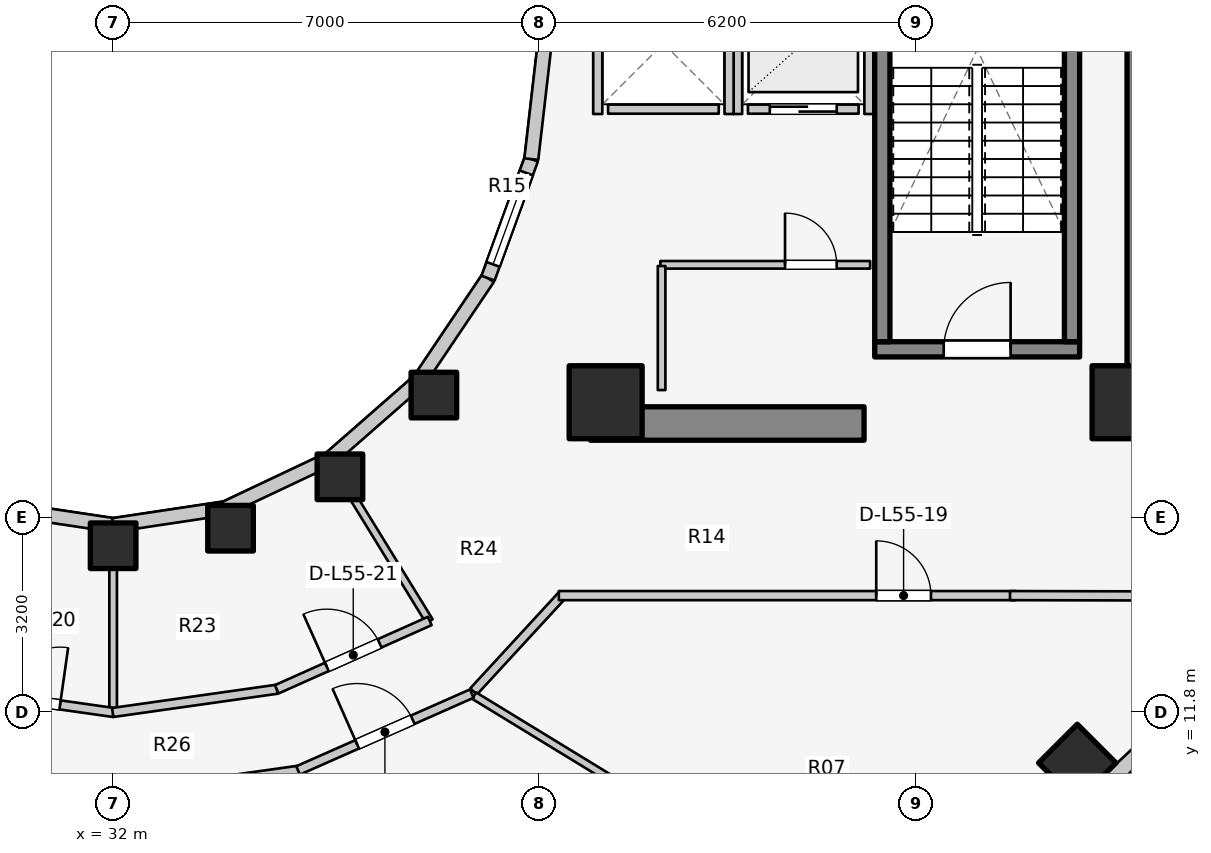
"""IFC4 building model, lengths in metres.
Left out: names, types, materials, properties, quantities, classifications, styles, units other than length and angle.
Written with IfcOpenShell. Run it as: python <this file> out.ifc"""

import sys

from ifc_helpers import new_model, si_unit, direction, frame, frame_2d, origin, origin_2d, place, context, subcontext, project, spatial, rectangle, extrude, element, fill, save


model = new_model("IFC4")
c1 = context("Model", 3, precision=1e-05, world=origin(), true_north=direction((0.0, 1.0)))
c2 = subcontext(c1, "Body", "Model", "MODEL_VIEW")
j1 = project(units=[si_unit("LENGTHUNIT", "METRE"), si_unit("PLANEANGLEUNIT", "RADIAN")], contexts=[c1])
p1 = place(None, origin())
s1 = spatial("IfcSite", under=j1, at=p1, CompositionType="ELEMENT")
p2 = place(p1, origin())
s2 = spatial("IfcBuilding", under=s1, at=p2, CompositionType="ELEMENT")
p3 = place(p2, frame((0.0, 0.0, 180.8)))
s3 = spatial("IfcBuildingStorey", under=s2, at=p3, CompositionType="ELEMENT", Elevation=180.8)
p4 = place(p3, frame((48.95, 17.05, 0.0), z_axis=(0.0, 0.0, 1.0), x_axis=(0.0, 1.0, 0.0)))
e1 = element("IfcWall", 1, at=p4, inside=s3, PredefinedType="SHEAR", context=c2, shape_type="SweptSolid", body=[
    extrude(rectangle(XDim=12.8, YDim=0.55, at=frame_2d((6.4, 0.0))), origin(), (0.0, 0.0, 1.0), 3.1),
])
p5 = place(p3, frame((39.85, 16.55, 0.0), z_axis=(0.0, 0.0, 1.0), x_axis=(1.0, 0.0, 0.0)))
e2 = element("IfcWall", 2, at=p5, inside=s3, PredefinedType="SHEAR", context=c2, shape_type="SweptSolid", body=[
    extrude(rectangle(XDim=4.5, YDim=0.55, at=frame_2d((2.25, 0.0))), origin(), (0.0, 0.0, 1.0), 3.1),
])
p6 = place(p3, frame((44.525, 17.77, 0.0), z_axis=(0.0, 0.0, 1.0), x_axis=(1.0, 0.0, 0.0)))
e3 = element("IfcWall", 3, at=p6, inside=s3, PredefinedType="SOLIDWALL", context=c2, shape_type="SweptSolid", body=[
    extrude(rectangle(XDim=3.37, YDim=0.25, at=frame_2d((1.685, 0.0))), origin(), (0.0, 0.0, 1.0), 3.1),
])
p7 = place(p6, frame((1.135, 0.0, 0.0)))
e4 = element("IfcOpeningElement", 4, at=p7, cuts=e3, PredefinedType="OPENING", context=c2, shape_type="SweptSolid", body=[
    extrude(rectangle(XDim=1.1, YDim=2.1, at=frame_2d((0.55, 1.05))), frame((0.0, 0.135, 0.0), z_axis=(0.0, -1.0, 0.0), x_axis=(1.0, 0.0, 0.0)), (0.0, 0.0, 1.0), 0.27),
])
for number, where, z_axis, x_axis in (
    (5, (44.65, 17.895, 0.0), (0.0, 0.0, 1.0), (0.0, 1.0, 0.0)),
    (6, (47.77, 17.895, 0.0), (0.0, 0.0, 1.0), (0.0, 1.0, 0.0)),
):
    element("IfcWall", number, at=place(p3, frame(where, z_axis=z_axis, x_axis=x_axis)), inside=s3, PredefinedType="SOLIDWALL", context=c2, shape_type="SweptSolid", body=[
        extrude(rectangle(XDim=7.81, YDim=0.25, at=frame_2d((3.905, 0.0))), origin(), (0.0, 0.0, 1.0), 3.1),
    ])
for number, where, z_axis, x_axis in (
    (7, (40.1, 16.9, 0.0), (0.0, 0.0, 1.0), (1.0, 0.0, 0.0)),
    (8, (48.7, 16.9, 0.0), (0.0, 0.0, 1.0), (1.0, 0.0, 0.0)),
):
    element("IfcColumn", number, at=place(p3, frame(where, z_axis=z_axis, x_axis=x_axis)), inside=s3, PredefinedType="COLUMN", context=c2, shape_type="SweptSolid", body=[
        extrude(rectangle(XDim=1.2, YDim=1.2, at=origin_2d()), origin(), (0.0, 0.0, 1.0), 3.1),
    ])
for number, where, z_axis, x_axis in (
    (9, (32.0, 14.54, 0.0), (0.0, 0.0, 1.0), (1.0, 0.0, 0.0)),
    (10, (33.931, 14.828, 0.0), (0.0, 0.0, 1.0), (1.0, 0.0, 0.0)),
    (11, (35.73, 15.673, 0.0), (0.0, 0.0, 1.0), (1.0, 0.0, 0.0)),
    (12, (37.275, 17.018, 0.0), (0.0, 0.0, 1.0), (1.0, 0.0, 0.0)),
):
    element("IfcColumn", number, at=place(p3, frame(where, z_axis=z_axis, x_axis=x_axis)), inside=s3, PredefinedType="COLUMN", context=c2, shape_type="SweptSolid", body=[
        extrude(rectangle(XDim=0.75, YDim=0.75, at=origin_2d()), origin(), (0.0, 0.0, 1.0), 3.1),
    ])
p8 = place(p3, frame((47.857, 10.969, 0.0), z_axis=(0.0, 0.0, 1.0), x_axis=(0.707106781187, -0.707106781187, 0.0)))
e13 = element("IfcColumn", 13, at=p8, inside=s3, PredefinedType="COLUMN", context=c2, shape_type="SweptSolid", body=[
    extrude(rectangle(XDim=0.9, YDim=0.9, at=origin_2d()), origin(), (0.0, 0.0, 1.0), 3.1),
])
for number, where, z_axis, x_axis in (
    (14, (30.157, 15.157, 0.0), (0.0, 0.0, 1.0), (0.989, -0.149, 0.0)),
    (15, (32.0, 14.88, 0.0), (0.0, 0.0, 1.0), (0.989, 0.149, 0.0)),
):
    element("IfcWall", number, at=place(p3, frame(where, z_axis=z_axis, x_axis=x_axis)), inside=s3, PredefinedType="STANDARD", context=c2, shape_type="SweptSolid", body=[
        extrude(rectangle(XDim=1.864, YDim=0.23, at=frame_2d((0.932, 0.0))), origin(), (0.0, 0.0, 1.0), 2.16),
    ])
p9 = place(p3, frame((33.843, 15.157, 0.0), z_axis=(0.0, 0.0, 1.0), x_axis=(0.904179699603, 0.427152280606, 0.0)))
e16 = element("IfcWall", 16, at=p9, inside=s3, PredefinedType="STANDARD", context=c2, shape_type="SweptSolid", body=[
    extrude(rectangle(XDim=1.899, YDim=0.23, at=frame_2d((0.95, 0.0))), origin(), (0.0, 0.0, 1.0), 2.16),
])
p10 = place(p3, frame((35.56, 15.968, 0.0), z_axis=(0.0, 0.0, 1.0), x_axis=(0.752576694707, 0.658504607869, 0.0)))
e17 = element("IfcWall", 17, at=p10, inside=s3, PredefinedType="STANDARD", context=c2, shape_type="SweptSolid", body=[
    extrude(rectangle(XDim=1.959, YDim=0.23, at=frame_2d((0.98, 0.0))), origin(), (0.0, 0.0, 1.0), 2.16),
])
p11 = place(p3, frame((37.035, 17.258, 0.0), z_axis=(0.0, 0.0, 1.0), x_axis=(0.558197800898, 0.829707909492, 0.0)))
e18 = element("IfcWall", 18, at=p11, inside=s3, PredefinedType="STANDARD", context=c2, shape_type="SweptSolid", body=[
    extrude(rectangle(XDim=2.027, YDim=0.23, at=frame_2d((1.013, 0.0))), origin(), (0.0, 0.0, 1.0), 2.16),
])
p12 = place(p3, frame((38.166, 18.94, 0.0), z_axis=(0.0, 0.0, 1.0), x_axis=(0.341423187295, 0.93990968033, 0.0)))
e19 = element("IfcWall", 19, at=p12, inside=s3, PredefinedType="STANDARD", context=c2, shape_type="SweptSolid", body=[
    extrude(rectangle(XDim=2.084, YDim=0.23, at=frame_2d((1.042, 0.0))), origin(), (0.0, 0.0, 1.0), 2.84),
])
p13 = place(p12, frame((0.242, 0.0, 0.85)))
e20 = element("IfcOpeningElement", 20, at=p13, cuts=e19, PredefinedType="OPENING", context=c2, shape_type="SweptSolid", body=[
    extrude(rectangle(XDim=1.6, YDim=1.65, at=frame_2d((0.8, 0.825))), frame((0.0, 0.125, 0.0), z_axis=(0.0, -1.0, 0.0), x_axis=(1.0, 0.0, 0.0)), (0.0, 0.0, 1.0), 0.25),
])
p14 = place(p3, frame((38.877, 20.898, 0.0), z_axis=(0.0, 0.0, 1.0), x_axis=(0.114711713601, 0.993398823617, 0.0)))
e21 = element("IfcWall", 21, at=p14, inside=s3, PredefinedType="STANDARD", context=c2, shape_type="SweptSolid", body=[
    extrude(rectangle(XDim=2.115, YDim=0.23, at=frame_2d((1.058, 0.0))), origin(), (0.0, 0.0, 1.0), 2.84),
])
p15 = place(p3, frame((48.269, 10.559, 0.0), z_axis=(0.0, 0.0, 1.0), x_axis=(0.727667301037, 0.68593024354, 0.0)))
e22 = element("IfcWall", 22, at=p15, inside=s3, PredefinedType="STANDARD", context=c2, shape_type="SweptSolid", body=[
    extrude(rectangle(XDim=4.604, YDim=0.26, at=frame_2d((2.302, 0.0))), origin(), (0.0, 0.0, 1.0), 2.85),
])
p16 = place(p15, frame((1.552, 0.0, 0.75)))
e23 = element("IfcOpeningElement", 23, at=p16, cuts=e22, PredefinedType="OPENING", context=c2, shape_type="SweptSolid", body=[
    extrude(rectangle(XDim=1.5, YDim=1.6, at=frame_2d((0.75, 0.8))), frame((0.0, 0.14, 0.0), z_axis=(0.0, -1.0, 0.0), x_axis=(1.0, 0.0, 0.0)), (0.0, 0.0, 1.0), 0.28),
])
p17 = place(p3, frame((42.44, 21.72, 0.0), z_axis=(0.0, 0.0, 1.0), x_axis=(1.0, 0.0, 0.0)))
e24 = element("IfcWall", 24, at=p17, inside=s3, PredefinedType="SOLIDWALL", context=c2, shape_type="SweptSolid", body=[
    extrude(rectangle(XDim=1.82, YDim=0.15, at=frame_2d((0.91, 0.0))), origin(), (0.0, 0.0, 1.0), 2.855),
])
p18 = place(p17, frame((0.36, 0.0, 0.0)))
e25 = element("IfcOpeningElement", 25, at=p18, cuts=e24, PredefinedType="OPENING", context=c2, shape_type="SweptSolid", body=[
    extrude(rectangle(XDim=1.1, YDim=2.1, at=frame_2d((0.55, 1.05))), frame((0.0, 0.085, 0.0), z_axis=(0.0, -1.0, 0.0), x_axis=(1.0, 0.0, 0.0)), (0.0, 0.0, 1.0), 0.17),
])
for number, where, z_axis, x_axis in (
    (26, (42.27, 21.64, 0.0), (0.0, 0.0, 1.0), (0.0, 1.0, 0.0)),
    (27, (44.43, 21.64, 0.0), (0.0, 0.0, 1.0), (0.0, 1.0, 0.0)),
):
    element("IfcWall", number, at=place(p3, frame(where, z_axis=z_axis, x_axis=x_axis)), inside=s3, PredefinedType="SOLIDWALL", context=c2, shape_type="SweptSolid", body=[
        extrude(rectangle(XDim=2.32, YDim=0.15, at=frame_2d((1.16, 0.0))), origin(), (0.0, 0.0, 1.0), 2.855),
    ])
p19 = place(p3, frame((40.14, 21.72, 0.0), z_axis=(0.0, 0.0, 1.0), x_axis=(1.0, 0.0, 0.0)))
e28 = element("IfcWall", 28, at=p19, inside=s3, PredefinedType="SOLIDWALL", context=c2, shape_type="SweptSolid", body=[
    extrude(rectangle(XDim=1.82, YDim=0.15, at=frame_2d((0.91, 0.0))), origin(), (0.0, 0.0, 1.0), 2.12),
])
p20 = place(p3, frame((39.97, 21.64, 0.0), z_axis=(0.0, 0.0, 1.0), x_axis=(0.0, 1.0, 0.0)))
e29 = element("IfcWall", 29, at=p20, inside=s3, PredefinedType="SOLIDWALL", context=c2, shape_type="SweptSolid", body=[
    extrude(rectangle(XDim=2.32, YDim=0.15, at=frame_2d((1.16, 0.0))), origin(), (0.0, 0.0, 1.0), 2.12),
])
p21 = place(p3, frame((42.13, 21.64, 0.0), z_axis=(0.0, 0.0, 1.0), x_axis=(0.0, 1.0, 0.0)))
e30 = element("IfcWall", 30, at=p21, inside=s3, PredefinedType="SOLIDWALL", context=c2, shape_type="SweptSolid", body=[
    extrude(rectangle(XDim=2.32, YDim=0.15, at=frame_2d((1.16, 0.0))), origin(), (0.0, 0.0, 1.0), 2.855),
])
p22 = place(p3, frame((41.0, 19.16, 0.0), z_axis=(0.0, 0.0, 1.0), x_axis=(1.0, 0.0, 0.0)))
e31 = element("IfcWall", 31, at=p22, inside=s3, PredefinedType="PARTITIONING", context=c2, shape_type="SweptSolid", body=[
    extrude(rectangle(XDim=3.45, YDim=0.125, at=frame_2d((1.725, 0.0))), origin(), (0.0, 0.0, 1.0), 2.12),
])
p23 = place(p22, frame((2.05, 0.0, 0.0)))
e32 = element("IfcOpeningElement", 32, at=p23, cuts=e31, PredefinedType="OPENING", context=c2, shape_type="SweptSolid", body=[
    extrude(rectangle(XDim=0.85, YDim=2.05, at=frame_2d((0.425, 1.025))), frame((0.0, 0.073, 0.0), z_axis=(0.0, -1.0, 0.0), x_axis=(1.0, 0.0, 0.0)), (0.0, 0.0, 1.0), 0.145),
])
p24 = place(p3, frame((41.02, 17.1, 0.0), z_axis=(0.0, 0.0, 1.0), x_axis=(0.0, 1.0, 0.0)))
e33 = element("IfcWall", 33, at=p24, inside=s3, PredefinedType="PARTITIONING", context=c2, shape_type="SweptSolid", body=[
    extrude(rectangle(XDim=2.04, YDim=0.125, at=frame_2d((1.02, 0.0))), origin(), (0.0, 0.0, 1.0), 2.855),
])
p25 = place(p3, frame((37.928, 12.144, 0.0), z_axis=(0.0, 0.0, 1.0), x_axis=(0.677579737957, 0.735449317567, 0.0)))
e34 = element("IfcWall", 34, at=p25, inside=s3, PredefinedType="PARTITIONING", context=c2, shape_type="SweptSolid", body=[
    extrude(rectangle(XDim=2.173, YDim=0.15, at=frame_2d((1.086, 0.0))), origin(), (0.0, 0.0, 1.0), 2.299),
])
p26 = place(p3, frame((39.33, 13.72, 0.0), z_axis=(0.0, 0.0, 1.0), x_axis=(1.0, 0.0, 0.0)))
e35 = element("IfcWall", 35, at=p26, inside=s3, PredefinedType="PARTITIONING", context=c2, shape_type="SweptSolid", body=[
    extrude(rectangle(XDim=7.52, YDim=0.15, at=frame_2d((3.76, 0.0))), origin(), (0.0, 0.0, 1.0), 2.299),
])
p27 = place(p26, frame((5.22, 0.0, 0.0)))
e36 = element("IfcOpeningElement", 36, at=p27, cuts=e35, PredefinedType="OPENING", context=c2, shape_type="SweptSolid", body=[
    extrude(rectangle(XDim=0.9, YDim=2.1, at=frame_2d((0.45, 1.05))), frame((0.0, 0.085, 0.0), z_axis=(0.0, -1.0, 0.0), x_axis=(1.0, 0.0, 0.0)), (0.0, 0.0, 1.0), 0.17),
])
p28 = place(p3, frame((46.75, 13.72, 0.0), z_axis=(0.0, 0.0, 1.0), x_axis=(0.999997122315, -0.00239903348, 0.0)))
e37 = element("IfcWall", 37, at=p28, inside=s3, PredefinedType="PARTITIONING", context=c2, shape_type="SweptSolid", body=[
    extrude(rectangle(XDim=4.885, YDim=0.15, at=frame_2d((2.442, 0.0))), origin(), (0.0, 0.0, 1.0), 2.22),
])
p29 = place(p3, frame((32.0, 14.9, 0.0), z_axis=(0.0, 0.0, 1.0), x_axis=(0.0, -1.0, 0.0)))
e38 = element("IfcWall", 38, at=p29, inside=s3, PredefinedType="PARTITIONING", context=c2, shape_type="SweptSolid", body=[
    extrude(rectangle(XDim=3.102, YDim=0.125, at=frame_2d((1.551, 0.0))), origin(), (0.0, 0.0, 1.0), 2.299),
])
p30 = place(p3, frame((35.55, 15.985, 0.0), z_axis=(0.0, 0.0, 1.0), x_axis=(0.523587550846, -0.851971875474, 0.0)))
e39 = element("IfcWall", 39, at=p30, inside=s3, PredefinedType="PARTITIONING", context=c2, shape_type="SweptSolid", body=[
    extrude(rectangle(XDim=3.153, YDim=0.125, at=frame_2d((1.577, 0.0))), origin(), (0.0, 0.0, 1.0), 2.299),
])
p31 = place(p3, frame((29.306, 12.18, 0.0), z_axis=(0.0, 0.0, 1.0), x_axis=(0.990145400278, -0.140043158738, 0.0)))
e40 = element("IfcWall", 40, at=p31, inside=s3, PredefinedType="PARTITIONING", context=c2, shape_type="SweptSolid", body=[
    extrude(rectangle(XDim=2.728, YDim=0.15, at=frame_2d((1.364, 0.0))), origin(), (0.0, 0.0, 1.0), 2.299),
])
p32 = place(p31, frame((0.889, 0.0, 0.0)))
e41 = element("IfcOpeningElement", 41, at=p32, cuts=e40, PredefinedType="OPENING", context=c2, shape_type="SweptSolid", body=[
    extrude(rectangle(XDim=0.95, YDim=2.1, at=frame_2d((0.475, 1.05))), frame((0.0, 0.085, 0.0), z_axis=(0.0, -1.0, 0.0), x_axis=(1.0, 0.0, 0.0)), (0.0, 0.0, 1.0), 0.17),
])
p33 = place(p3, frame((31.993, 11.798, 0.0), z_axis=(0.0, 0.0, 1.0), x_axis=(0.990145400278, 0.140043158738, 0.0)))
e42 = element("IfcWall", 42, at=p33, inside=s3, PredefinedType="PARTITIONING", context=c2, shape_type="SweptSolid", body=[
    extrude(rectangle(XDim=2.728, YDim=0.15, at=frame_2d((1.364, 0.0))), origin(), (0.0, 0.0, 1.0), 2.299),
])
p34 = place(p3, frame((34.69, 12.179, 0.0), z_axis=(0.0, 0.0, 1.0), x_axis=(0.913145536541, 0.407633694749, 0.0)))
e43 = element("IfcWall", 43, at=p34, inside=s3, PredefinedType="PARTITIONING", context=c2, shape_type="SweptSolid", body=[
    extrude(rectangle(XDim=2.756, YDim=0.15, at=frame_2d((1.378, 0.0))), origin(), (0.0, 0.0, 1.0), 2.299),
])
p35 = place(p34, frame((0.903, 0.0, 0.0)))
e44 = element("IfcOpeningElement", 44, at=p35, cuts=e43, PredefinedType="OPENING", context=c2, shape_type="SweptSolid", body=[
    extrude(rectangle(XDim=0.95, YDim=2.1, at=frame_2d((0.475, 1.05))), frame((0.0, 0.085, 0.0), z_axis=(0.0, -1.0, 0.0), x_axis=(1.0, 0.0, 0.0)), (0.0, 0.0, 1.0), 0.17),
])
p36 = place(p3, frame((37.938, 12.075, 0.0), z_axis=(0.0, 0.0, 1.0), x_axis=(0.853440334679, -0.521190555501, 0.0)))
e45 = element("IfcWall", 45, at=p36, inside=s3, PredefinedType="PARTITIONING", context=c2, shape_type="SweptSolid", body=[
    extrude(rectangle(XDim=6.966, YDim=0.125, at=frame_2d((3.483, 0.0))), origin(), (0.0, 0.0, 1.0), 2.299),
])
p37 = place(p3, frame((28.901, 10.854, 0.0), z_axis=(0.0, 0.0, 1.0), x_axis=(0.990251283702, -0.139292480508, 0.0)))
e46 = element("IfcWall", 46, at=p37, inside=s3, PredefinedType="PARTITIONING", context=c2, shape_type="SweptSolid", body=[
    extrude(rectangle(XDim=3.179, YDim=0.15, at=frame_2d((1.59, 0.0))), origin(), (0.0, 0.0, 1.0), 2.299),
])
p38 = place(p3, frame((31.992, 10.418, 0.0), z_axis=(0.0, 0.0, 1.0), x_axis=(0.990254709652, 0.13926812274, 0.0)))
e47 = element("IfcWall", 47, at=p38, inside=s3, PredefinedType="PARTITIONING", context=c2, shape_type="SweptSolid", body=[
    extrude(rectangle(XDim=3.096, YDim=0.15, at=frame_2d((1.548, 0.0))), origin(), (0.0, 0.0, 1.0), 2.299),
])
p39 = place(p3, frame((35.042, 10.844, 0.0), z_axis=(0.0, 0.0, 1.0), x_axis=(0.914519212393, 0.40454247016, 0.0)))
e48 = element("IfcWall", 48, at=p39, inside=s3, PredefinedType="PARTITIONING", context=c2, shape_type="SweptSolid", body=[
    extrude(rectangle(XDim=3.124, YDim=0.15, at=frame_2d((1.562, 0.0))), origin(), (0.0, 0.0, 1.0), 2.299),
])
p40 = place(p39, frame((1.062, 0.0, 0.0)))
e49 = element("IfcOpeningElement", 49, at=p40, cuts=e48, PredefinedType="OPENING", context=c2, shape_type="SweptSolid", body=[
    extrude(rectangle(XDim=1.0, YDim=2.1, at=frame_2d((0.5, 1.05))), frame((0.0, 0.085, 0.0), z_axis=(0.0, -1.0, 0.0), x_axis=(1.0, 0.0, 0.0)), (0.0, 0.0, 1.0), 0.17),
])
p41 = place(p13, origin())
e50 = element("IfcWindow", 50, at=p41, inside=s3, PartitioningType="SINGLE_PANEL", PredefinedType="WINDOW", context=c2, shape_type="SweptSolid", body=[
    extrude(rectangle(XDim=1.6, YDim=1.65, at=frame_2d((0.8, 0.825))), frame((0.0, 0.03, 0.0), z_axis=(0.0, -1.0, 0.0), x_axis=(1.0, 0.0, 0.0)), (0.0, 0.0, 1.0), 0.06),
])
fill(e20, e50)
p42 = place(p7, origin())
e51 = element("IfcDoor", 51, at=p42, inside=s3, OperationType="SINGLE_SWING_RIGHT", PredefinedType="DOOR", context=c2, shape_type="SweptSolid", body=[
    extrude(rectangle(XDim=1.1, YDim=2.1, at=frame_2d((0.55, 1.05))), frame((0.0, 0.025, 0.0), z_axis=(0.0, -1.0, 0.0), x_axis=(1.0, 0.0, 0.0)), (0.0, 0.0, 1.0), 0.05),
])
fill(e4, e51)
p43 = place(p18, origin())
e52 = element("IfcDoor", 52, at=p43, inside=s3, OperationType="DOUBLE_DOOR_SLIDING", PredefinedType="DOOR", context=c2, shape_type="SweptSolid", body=[
    extrude(rectangle(XDim=1.1, YDim=2.1, at=frame_2d((0.55, 1.05))), frame((0.0, 0.025, 0.0), z_axis=(0.0, -1.0, 0.0), x_axis=(1.0, 0.0, 0.0)), (0.0, 0.0, 1.0), 0.05),
])
fill(e25, e52)
p44 = place(p23, origin())
e53 = element("IfcDoor", 53, at=p44, inside=s3, OperationType="SINGLE_SWING_LEFT", PredefinedType="DOOR", context=c2, shape_type="SweptSolid", body=[
    extrude(rectangle(XDim=0.85, YDim=2.05, at=frame_2d((0.425, 1.025))), frame((0.0, 0.025, 0.0), z_axis=(0.0, -1.0, 0.0), x_axis=(1.0, 0.0, 0.0)), (0.0, 0.0, 1.0), 0.05),
])
fill(e32, e53)
p45 = place(p27, origin())
e54 = element("IfcDoor", 54, at=p45, inside=s3, OperationType="SINGLE_SWING_LEFT", PredefinedType="DOOR", context=c2, shape_type="SweptSolid", body=[
    extrude(rectangle(XDim=0.9, YDim=2.1, at=frame_2d((0.45, 1.05))), frame((0.0, 0.025, 0.0), z_axis=(0.0, -1.0, 0.0), x_axis=(1.0, 0.0, 0.0)), (0.0, 0.0, 1.0), 0.05),
])
fill(e36, e54)
p46 = place(p32, origin())
e55 = element("IfcDoor", 55, at=p46, inside=s3, OperationType="SINGLE_SWING_RIGHT", PredefinedType="DOOR", context=c2, shape_type="SweptSolid", body=[
    extrude(rectangle(XDim=0.95, YDim=2.1, at=frame_2d((0.475, 1.05))), frame((0.0, 0.025, 0.0), z_axis=(0.0, -1.0, 0.0), x_axis=(1.0, 0.0, 0.0)), (0.0, 0.0, 1.0), 0.05),
])
fill(e41, e55)
p47 = place(p35, origin())
e56 = element("IfcDoor", 56, at=p47, inside=s3, OperationType="SINGLE_SWING_LEFT", PredefinedType="DOOR", context=c2, shape_type="SweptSolid", body=[
    extrude(rectangle(XDim=0.95, YDim=2.1, at=frame_2d((0.475, 1.05))), frame((0.0, 0.025, 0.0), z_axis=(0.0, -1.0, 0.0), x_axis=(1.0, 0.0, 0.0)), (0.0, 0.0, 1.0), 0.05),
])
fill(e44, e56)
p48 = place(p40, origin())
e57 = element("IfcDoor", 57, at=p48, inside=s3, OperationType="SINGLE_SWING_LEFT", PredefinedType="DOOR", context=c2, shape_type="SweptSolid", body=[
    extrude(rectangle(XDim=1.0, YDim=2.1, at=frame_2d((0.5, 1.05))), frame((0.0, 0.025, 0.0), z_axis=(0.0, -1.0, 0.0), x_axis=(1.0, 0.0, 0.0)), (0.0, 0.0, 1.0), 0.05),
])
fill(e49, e57)
save(model, sys.argv[1])
